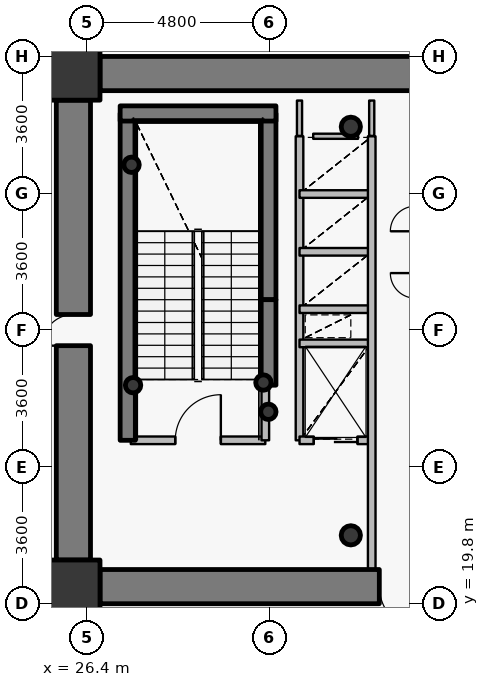
"""IFC4 building model, lengths in metres.
Left out: names, types, materials, properties, quantities, classifications, styles, units other than length and angle.
Written with IfcOpenShell. Run it as: python <this file> out.ifc"""

import sys

from ifc_helpers import new_model, si_unit, direction, frame, frame_2d, origin, origin_2d, place, context, subcontext, project, spatial, rectangle, hollow_circle, extrude, source, transform, mapped, element, fill, save


model = new_model("IFC4")
c1 = context("Model", 3, precision=1e-05, world=origin(), true_north=direction((0.0, 1.0)))
c2 = subcontext(c1, "Body", "Model", "MODEL_VIEW")
j1 = project(units=[si_unit("LENGTHUNIT", "METRE"), si_unit("PLANEANGLEUNIT", "RADIAN")], contexts=[c1])
p1 = place(None, origin())
s1 = spatial("IfcSite", under=j1, at=p1, CompositionType="ELEMENT")
p2 = place(p1, origin())
s2 = spatial("IfcBuilding", under=s1, at=p2, CompositionType="ELEMENT")
p3 = place(p2, frame((0.0, 0.0, 70.2)))
s3 = spatial("IfcBuildingStorey", under=s2, at=p3, CompositionType="ELEMENT", Elevation=70.2)
for number, where, z_axis, x_axis in (
    (1, (26.05, 20.25, 0.0), (0.0, 0.0, 1.0), (1.0, 0.0, 0.0)),
    (2, (26.05, 33.75, 0.0), (0.0, 0.0, 1.0), (1.0, 0.0, 0.0)),
):
    element("IfcColumn", number, at=place(p3, frame(where, z_axis=z_axis, x_axis=x_axis)), inside=s3, PredefinedType="COLUMN", context=c2, shape_type="SweptSolid", body=[
        extrude(rectangle(XDim=1.4, YDim=1.4, at=origin_2d()), origin(), (0.0, 0.0, 1.0), 4.2),
    ])
for number, where, z_axis, x_axis in (
    (3, (33.35, 21.6, 0.0), (0.0, 0.0, 1.0), (1.0, 0.0, 0.0)),
    (4, (33.35, 32.35, 0.0), (0.0, 0.0, 1.0), (1.0, 0.0, 0.0)),
):
    element("IfcColumn", number, at=place(p3, frame(where, z_axis=z_axis, x_axis=x_axis)), inside=s3, PredefinedType="COLUMN", context=c2, shape_type="SweptSolid", body=[
        extrude(hollow_circle(Radius=0.254, WallThickness=0.02, at=origin_2d()), origin(), (0.0, 0.0, 1.0), 4.2),
    ])
p4 = place(p3, frame((27.48, 24.1, 0.0), z_axis=(0.0, 0.0, 1.0), x_axis=(0.0, 1.0, 0.0)))
e5 = element("IfcWall", 5, at=p4, inside=s3, PredefinedType="SHEAR", context=c2, shape_type="SweptSolid", body=[
    extrude(rectangle(XDim=8.6, YDim=0.4, at=frame_2d((4.3, 0.0))), origin(), (0.0, 0.0, 1.0), 4.2),
])
p5 = place(p3, frame((31.18, 27.8, 0.0), z_axis=(0.0, 0.0, 1.0), x_axis=(0.0, 1.0, 0.0)))
e6 = element("IfcWall", 6, at=p5, inside=s3, PredefinedType="SHEAR", context=c2, shape_type="SweptSolid", body=[
    extrude(rectangle(XDim=4.9, YDim=0.4, at=frame_2d((2.45, 0.0))), origin(), (0.0, 0.0, 1.0), 4.2),
])
p6 = place(p3, frame((27.28, 32.7, 0.0), z_axis=(0.0, 0.0, 1.0), x_axis=(1.0, 0.0, 0.0)))
e7 = element("IfcWall", 7, at=p6, inside=s3, PredefinedType="SHEAR", context=c2, shape_type="SweptSolid", body=[
    extrude(rectangle(XDim=4.1, YDim=0.4, at=frame_2d((2.05, 0.0))), origin(), (0.0, 0.0, 1.0), 4.2),
])
for number, where, z_axis, x_axis in (
    (8, (27.58, 31.35, 0.0), (0.0, 0.0, 1.0), (1.0, 0.0, 0.0)),
    (9, (31.05, 25.62, 0.0), (0.0, 0.0, 1.0), (1.0, 0.0, 0.0)),
    (10, (31.18, 24.85, 0.0), (0.0, 0.0, 1.0), (1.0, 0.0, 0.0)),
    (11, (27.62, 25.55, 0.0), (0.0, 0.0, 1.0), (1.0, 0.0, 0.0)),
):
    element("IfcColumn", number, at=place(p3, frame(where, z_axis=z_axis, x_axis=x_axis)), inside=s3, PredefinedType="COLUMN", context=c2, shape_type="SweptSolid", body=[
        extrude(hollow_circle(Radius=0.203, WallThickness=0.016, at=origin_2d()), origin(), (0.0, 0.0, 1.0), 4.2),
    ])
p7 = place(p3, frame((26.75, 33.75, 0.0), z_axis=(0.0, 0.0, 1.0), x_axis=(1.0, 0.0, 0.0)))
e12 = element("IfcWall", 12, at=p7, inside=s3, PredefinedType="SHEAR", context=c2, shape_type="SweptSolid", body=[
    extrude(rectangle(XDim=18.5, YDim=0.9, at=frame_2d((9.25, 0.0))), origin(), (0.0, 0.0, 1.0), 3.4),
])
p8 = place(p3, frame((45.25, 20.25, 0.0), z_axis=(0.0, 0.0, 1.0), x_axis=(-1.0, 0.0, 0.0)))
e13 = element("IfcWall", 13, at=p8, inside=s3, PredefinedType="SHEAR", context=c2, shape_type="SweptSolid", body=[
    extrude(rectangle(XDim=18.5, YDim=0.9, at=frame_2d((9.25, 0.0))), origin(), (0.0, 0.0, 1.0), 3.4),
])
p9 = place(p8, frame((10.0, 0.0, 0.0)))
e14 = element("IfcOpeningElement", 14, at=p9, cuts=e13, PredefinedType="OPENING", context=c2, shape_type="SweptSolid", body=[
    extrude(rectangle(XDim=1.15, YDim=2.15, at=origin_2d()), frame((0.575, 0.46, 1.075), z_axis=(0.0, -1.0, 0.0), x_axis=(1.0, 0.0, 0.0)), (0.0, 0.0, 1.0), 0.92),
])
p10 = place(p3, frame((26.05, 20.95, 0.0), z_axis=(0.0, 0.0, 1.0), x_axis=(0.0, 1.0, 0.0)))
e15 = element("IfcWall", 15, at=p10, inside=s3, PredefinedType="SHEAR", context=c2, shape_type="SweptSolid", body=[
    extrude(rectangle(XDim=12.1, YDim=0.9, at=frame_2d((6.05, 0.0))), origin(), (0.0, 0.0, 1.0), 3.4),
])
p11 = place(p10, frame((5.64, 0.0, 0.0)))
e16 = element("IfcOpeningElement", 16, at=p11, cuts=e15, PredefinedType="OPENING", context=c2, shape_type="SweptSolid", body=[
    extrude(rectangle(XDim=0.82, YDim=2.1, at=origin_2d()), frame((0.41, 0.46, 1.05), z_axis=(0.0, -1.0, 0.0), x_axis=(1.0, 0.0, 0.0)), (0.0, 0.0, 1.0), 0.92),
])
p12 = place(p3, frame((31.18, 25.55, 0.0), z_axis=(0.0, 0.0, 1.0), x_axis=(0.0, 1.0, 0.0)))
e17 = element("IfcWall", 17, at=p12, inside=s3, PredefinedType="SHEAR", context=c2, shape_type="SweptSolid", body=[
    extrude(rectangle(XDim=2.25, YDim=0.4, at=frame_2d((1.125, 0.0))), origin(), (0.0, 0.0, 1.0), 3.55),
])
p13 = place(p3, frame((27.56, 24.1, 0.0), z_axis=(0.0, 0.0, 1.0), x_axis=(1.0, 0.0, 0.0)))
e18 = element("IfcWall", 18, at=p13, inside=s3, PredefinedType="PARTITIONING", context=c2, shape_type="SweptSolid", body=[
    extrude(rectangle(XDim=3.54, YDim=0.2, at=frame_2d((1.77, 0.0))), origin(), (0.0, 0.0, 1.0), 3.95),
])
p14 = place(p13, frame((1.17, 0.0, 0.0)))
e19 = element("IfcOpeningElement", 19, at=p14, cuts=e18, PredefinedType="OPENING", context=c2, shape_type="SweptSolid", body=[
    extrude(rectangle(XDim=1.2, YDim=2.15, at=origin_2d()), frame((0.6, 0.11, 1.075), z_axis=(0.0, -1.0, 0.0), x_axis=(1.0, 0.0, 0.0)), (0.0, 0.0, 1.0), 0.22),
])
p15 = place(p3, frame((31.1, 24.1, 0.0), z_axis=(0.0, 0.0, 1.0), x_axis=(0.0, 1.0, 0.0)))
e20 = element("IfcWall", 20, at=p15, inside=s3, PredefinedType="PARTITIONING", context=c2, shape_type="SweptSolid", body=[
    extrude(rectangle(XDim=1.44, YDim=0.2, at=frame_2d((0.72, 0.0))), origin(), (0.0, 0.0, 1.0), 3.95),
])
p16 = place(p3, frame((32.0, 24.1, 0.0), z_axis=(0.0, 0.0, 1.0), x_axis=(0.0, 1.0, 0.0)))
e21 = element("IfcWall", 21, at=p16, inside=s3, PredefinedType="PARTITIONING", context=c2, shape_type="SweptSolid", body=[
    extrude(rectangle(XDim=8.0, YDim=0.2, at=frame_2d((4.0, 0.0))), origin(), (0.0, 0.0, 1.0), 3.95),
])
p17 = place(p3, frame((32.0, 24.1, 0.0), z_axis=(0.0, 0.0, 1.0), x_axis=(1.0, 0.0, 0.0)))
e22 = element("IfcWall", 22, at=p17, inside=s3, PredefinedType="PARTITIONING", context=c2, shape_type="SweptSolid", body=[
    extrude(rectangle(XDim=1.9, YDim=0.2, at=frame_2d((0.95, 0.0))), origin(), (0.0, 0.0, 1.0), 3.535),
])
p18 = place(p17, frame((0.375, 0.0, 0.0)))
e23 = element("IfcOpeningElement", 23, at=p18, cuts=e22, PredefinedType="OPENING", context=c2, shape_type="SweptSolid", body=[
    extrude(rectangle(XDim=1.15, YDim=2.15, at=origin_2d()), frame((0.575, 0.11, 1.075), z_axis=(0.0, -1.0, 0.0), x_axis=(1.0, 0.0, 0.0)), (0.0, 0.0, 1.0), 0.22),
])
for number, where, z_axis, x_axis in (
    (24, (32.0, 26.65, 0.0), (0.0, 0.0, 1.0), (1.0, 0.0, 0.0)),
    (25, (32.0, 27.55, 0.0), (0.0, 0.0, 1.0), (1.0, 0.0, 0.0)),
    (26, (32.0, 29.06, 0.0), (0.0, 0.0, 1.0), (1.0, 0.0, 0.0)),
    (27, (32.0, 30.58, 0.0), (0.0, 0.0, 1.0), (1.0, 0.0, 0.0)),
):
    element("IfcWall", number, at=place(p3, frame(where, z_axis=z_axis, x_axis=x_axis)), inside=s3, PredefinedType="PARTITIONING", context=c2, shape_type="SweptSolid", body=[
        extrude(rectangle(XDim=1.9, YDim=0.2, at=frame_2d((0.95, 0.0))), origin(), (0.0, 0.0, 1.0), 3.535),
    ])
p19 = place(p3, frame((33.9, 20.7, 0.0), z_axis=(0.0, 0.0, 1.0), x_axis=(0.0, 1.0, 0.0)))
e28 = element("IfcWall", 28, at=p19, inside=s3, PredefinedType="PARTITIONING", context=c2, shape_type="SweptSolid", body=[
    extrude(rectangle(XDim=11.4, YDim=0.2, at=frame_2d((5.7, 0.0))), origin(), (0.0, 0.0, 1.0), 3.535),
])
p20 = place(p3, frame((32.36, 32.1, 0.0), z_axis=(0.0, 0.0, 1.0), x_axis=(1.0, 0.0, 0.0)))
e29 = element("IfcWall", 29, at=p20, inside=s3, PredefinedType="PARTITIONING", context=c2, shape_type="SweptSolid", body=[
    extrude(rectangle(XDim=1.18, YDim=0.135, at=frame_2d((0.59, 0.0))), origin(), (0.0, 0.0, 1.0), 3.535),
])
p21 = place(p3, frame((32.0, 33.04, 0.0), z_axis=(0.0, 0.0, 1.0), x_axis=(0.0, -1.0, 0.0)))
e30 = element("IfcWall", 30, at=p21, inside=s3, PredefinedType="PARTITIONING", context=c2, shape_type="SweptSolid", body=[
    extrude(rectangle(XDim=0.93, YDim=0.135, at=frame_2d((0.465, 0.0))), origin(), (0.0, 0.0, 1.0), 3.485),
])
p22 = place(p3, frame((33.9, 32.11, 0.0), z_axis=(0.0, 0.0, 1.0), x_axis=(0.0, 1.0, 0.0)))
e31 = element("IfcWall", 31, at=p22, inside=s3, PredefinedType="PARTITIONING", context=c2, shape_type="SweptSolid", body=[
    extrude(rectangle(XDim=0.93, YDim=0.135, at=frame_2d((0.465, 0.0))), origin(), (0.0, 0.0, 1.0), 3.535),
])
p23 = place(p3, frame((26.74, 34.2, 0.0), z_axis=(0.0, 0.0, 1.0), x_axis=(-1.0, 0.0, 0.0)))
e32 = element("IfcWall", 32, at=p23, inside=s3, PredefinedType="PARTITIONING", context=c2, shape_type="SweptSolid", body=[
    extrude(rectangle(XDim=1.14, YDim=0.135, at=frame_2d((0.57, 0.0))), origin(), (0.0, 0.0, 1.0), 3.285),
])
p24 = place(p3, frame((25.6, 33.893, 0.0), z_axis=(0.0, 0.0, 1.0), x_axis=(0.0, -1.0, 0.0)))
e33 = element("IfcWall", 33, at=p24, inside=s3, PredefinedType="PARTITIONING", context=c2, shape_type="SweptSolid", body=[
    extrude(rectangle(XDim=0.833, YDim=0.135, at=frame_2d((0.416, 0.0))), origin(), (0.0, 0.0, 1.0), 3.95),
])
p25 = place(p3, frame((25.6, 20.94, 0.0), z_axis=(0.0, 0.0, 1.0), x_axis=(0.0, -1.0, 0.0)))
e34 = element("IfcWall", 34, at=p25, inside=s3, PredefinedType="PARTITIONING", context=c2, shape_type="SweptSolid", body=[
    extrude(rectangle(XDim=1.14, YDim=0.135, at=frame_2d((0.57, 0.0))), origin(), (0.0, 0.0, 1.0), 3.95),
])
p26 = place(p3, frame((25.907, 19.8, 0.0), z_axis=(0.0, 0.0, 1.0), x_axis=(1.0, 0.0, 0.0)))
e35 = element("IfcWall", 35, at=p26, inside=s3, PredefinedType="PARTITIONING", context=c2, shape_type="SweptSolid", body=[
    extrude(rectangle(XDim=0.833, YDim=0.135, at=frame_2d((0.416, 0.0))), origin(), (0.0, 0.0, 1.0), 3.285),
])
m1 = source(origin(), c2, "Body", "SweptSolid", [
    extrude(rectangle(XDim=0.82, YDim=2.1, at=origin_2d()), frame((0.41, 0.025, 1.05), z_axis=(0.0, -1.0, 0.0), x_axis=(1.0, 0.0, 0.0)), (0.0, 0.0, 1.0), 0.05),
])
p27 = place(p11, origin())
e36 = element("IfcDoor", 36, at=p27, inside=s3, OperationType="SINGLE_SWING_LEFT", PredefinedType="DOOR", context=c2, shape_type="MappedRepresentation", body=[
    mapped(m1, transform((0.0, 0.0, 0.0), x_axis=(1.0, 0.0, 0.0), y_axis=(0.0, 1.0, 0.0), z_axis=(0.0, 0.0, 1.0), scale=1.0)),
])
fill(e16, e36)
m2 = source(origin(), c2, "Body", "SweptSolid", [
    extrude(rectangle(XDim=1.15, YDim=2.15, at=origin_2d()), frame((0.575, 0.025, 1.075), z_axis=(0.0, -1.0, 0.0), x_axis=(1.0, 0.0, 0.0)), (0.0, 0.0, 1.0), 0.05),
])
p28 = place(p9, origin())
e37 = element("IfcDoor", 37, at=p28, inside=s3, OperationType="SINGLE_SWING_LEFT", PredefinedType="DOOR", context=c2, shape_type="MappedRepresentation", body=[
    mapped(m2, transform((0.0, 0.0, 0.0), x_axis=(1.0, 0.0, 0.0), y_axis=(0.0, 1.0, 0.0), z_axis=(0.0, 0.0, 1.0), scale=1.0)),
])
fill(e14, e37)
m3 = source(origin(), c2, "Body", "SweptSolid", [
    extrude(rectangle(XDim=1.2, YDim=2.15, at=origin_2d()), frame((0.6, 0.025, 1.075), z_axis=(0.0, -1.0, 0.0), x_axis=(1.0, 0.0, 0.0)), (0.0, 0.0, 1.0), 0.05),
])
p29 = place(p14, origin())
e38 = element("IfcDoor", 38, at=p29, inside=s3, OperationType="SINGLE_SWING_RIGHT", PredefinedType="DOOR", context=c2, shape_type="MappedRepresentation", body=[
    mapped(m3, transform((0.0, 0.0, 0.0), x_axis=(1.0, 0.0, 0.0), y_axis=(0.0, 1.0, 0.0), z_axis=(0.0, 0.0, 1.0), scale=1.0)),
])
fill(e19, e38)
m4 = source(origin(), c2, "Body", "SweptSolid", [
    extrude(rectangle(XDim=1.15, YDim=2.15, at=origin_2d()), frame((0.575, 0.025, 1.075), z_axis=(0.0, -1.0, 0.0), x_axis=(1.0, 0.0, 0.0)), (0.0, 0.0, 1.0), 0.05),
])
p30 = place(p18, origin())
e39 = element("IfcDoor", 39, at=p30, inside=s3, OperationType="DOUBLE_DOOR_SLIDING", PredefinedType="USERDEFINED", context=c2, shape_type="MappedRepresentation", body=[
    mapped(m4, transform((0.0, 0.0, 0.0), x_axis=(1.0, 0.0, 0.0), y_axis=(0.0, 1.0, 0.0), z_axis=(0.0, 0.0, 1.0), scale=1.0)),
])
fill(e23, e39)
save(model, sys.argv[1])
